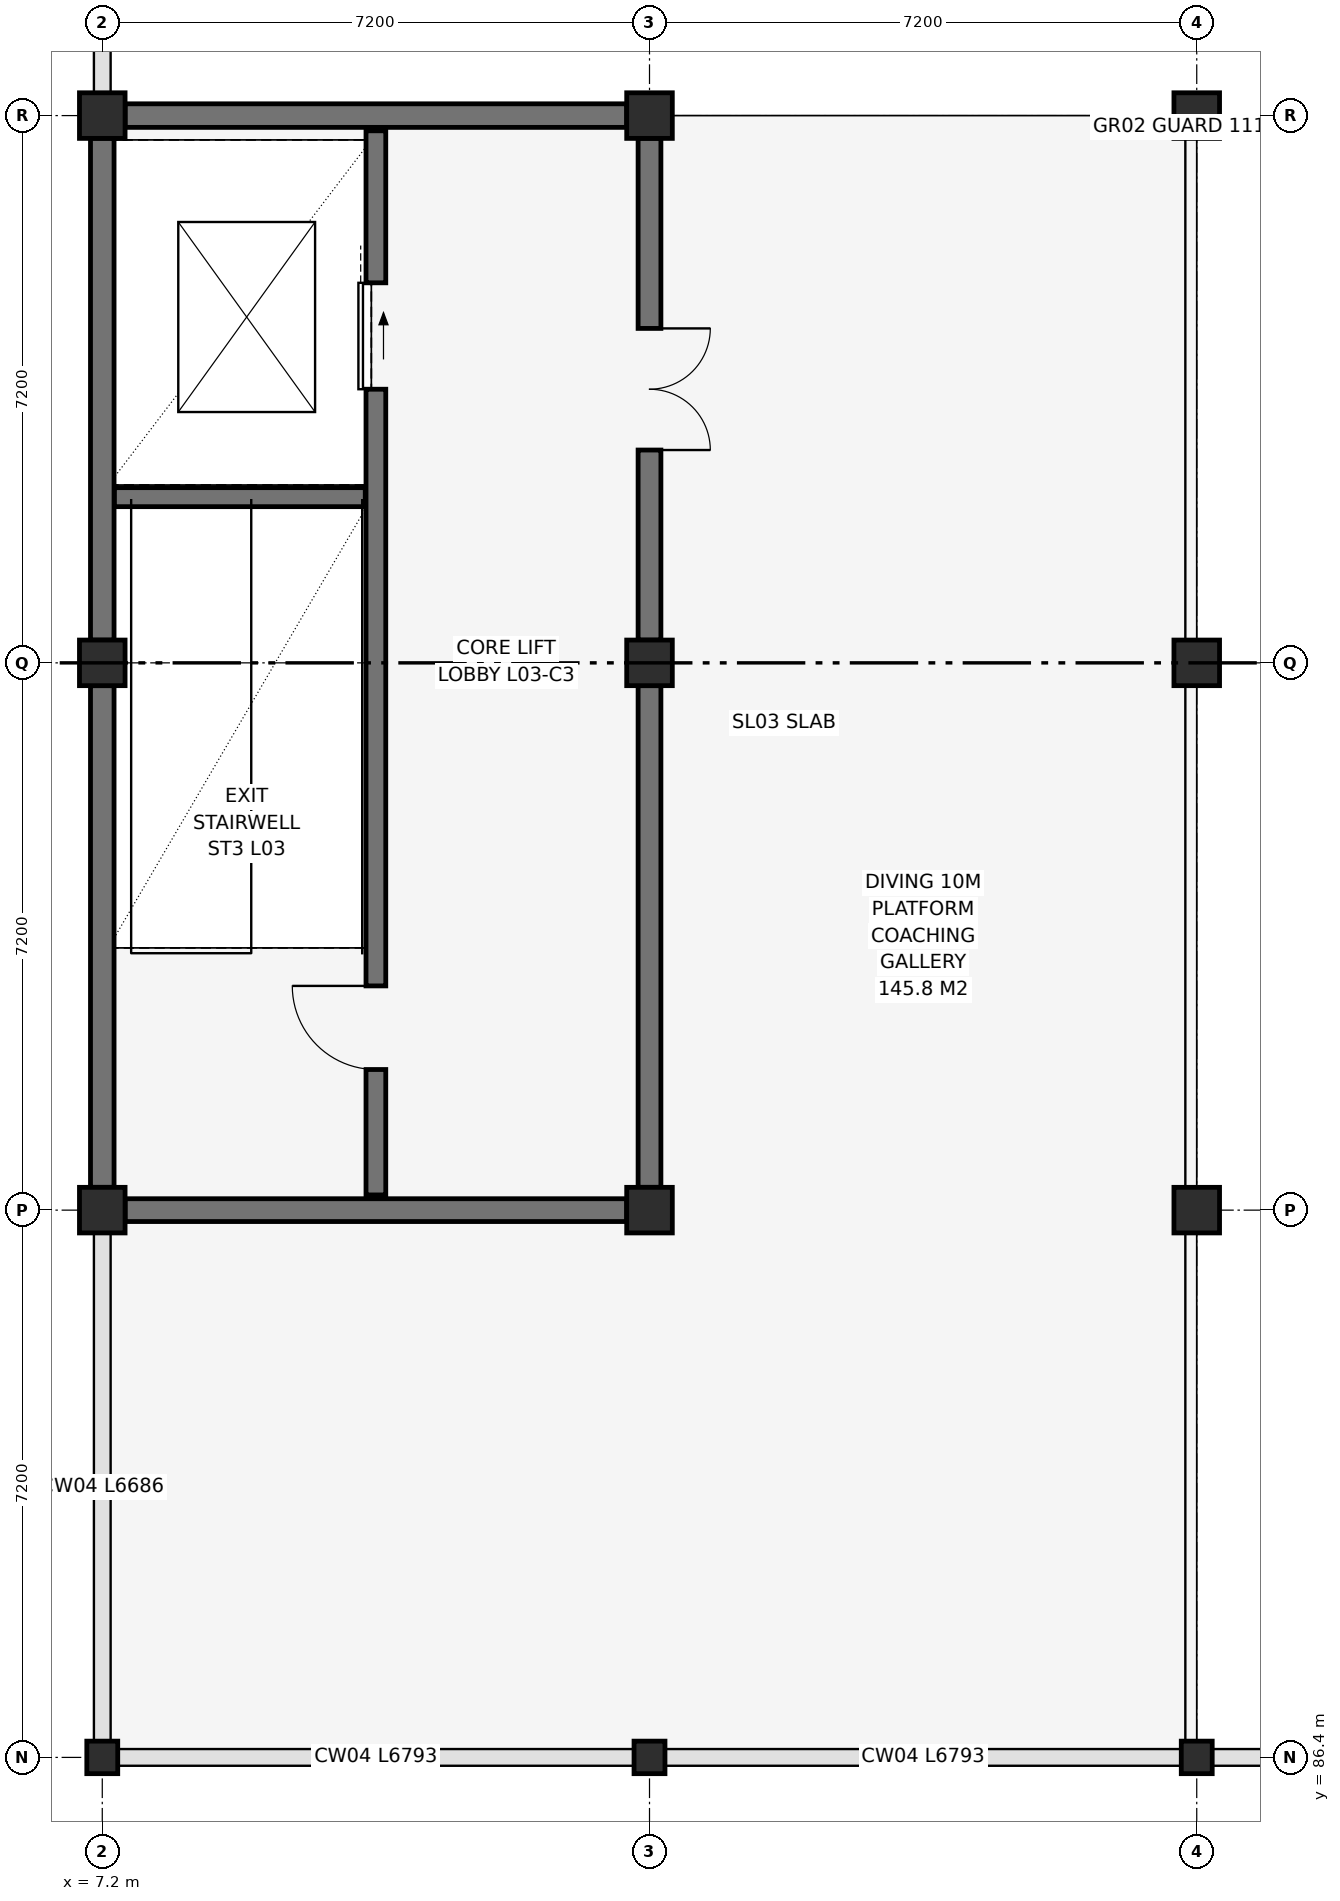
"""IFC4 building model, lengths in metres.
Left out: names, types, materials, properties, quantities, classifications, styles, units other than length and angle.
Written with IfcOpenShell. Run it as: python <this file> out.ifc"""

import sys

from ifc_helpers import new_model, si_unit, direction, frame, frame_2d, origin, origin_2d, place, context, subcontext, project, spatial, rectangle, i_section, extrude, element, fill, save


model = new_model("IFC4")
c1 = context("Model", 3, precision=1e-05, world=origin(), true_north=direction((0.0, 1.0)))
c2 = subcontext(c1, "Body", "Model", "MODEL_VIEW")
j1 = project(units=[si_unit("LENGTHUNIT", "METRE"), si_unit("PLANEANGLEUNIT", "RADIAN")], contexts=[c1])
p1 = place(None, origin())
s1 = spatial("IfcSite", under=j1, at=p1, CompositionType="ELEMENT")
p2 = place(p1, origin())
s2 = spatial("IfcBuilding", under=s1, at=p2, CompositionType="ELEMENT")
p3 = place(p2, frame((0.0, 0.0, 15.0)))
s3 = spatial("IfcBuildingStorey", under=s2, at=p3, CompositionType="ELEMENT", Elevation=15.0)
p4 = place(p3, frame((7.2, 86.4, 0.0), z_axis=(0.0, 0.0, 1.0), x_axis=(1.0, 0.0, 0.0)))
e1 = element("IfcColumn", 1, at=p4, inside=s3, PredefinedType="COLUMN", context=c2, shape_type="SweptSolid", body=[
    extrude(i_section(OverallWidth=0.407, OverallDepth=0.428, WebThickness=0.02, FlangeThickness=0.035, FilletRadius=0.022, at=origin_2d()), origin(), (0.0, 0.0, 1.0), 6.425),
])
for number, where, z_axis, x_axis in (
    (2, (7.2, 93.6, 0.0), (0.0, 0.0, 1.0), (1.0, 0.0, 0.0)),
    (3, (7.2, 100.8, 0.0), (0.0, 0.0, 1.0), (1.0, 0.0, 0.0)),
    (4, (7.2, 108.0, 0.0), (0.0, 0.0, 1.0), (1.0, 0.0, 0.0)),
):
    element("IfcColumn", number, at=place(p3, frame(where, z_axis=z_axis, x_axis=x_axis)), inside=s3, PredefinedType="COLUMN", context=c2, shape_type="SweptSolid", body=[
        extrude(rectangle(XDim=0.6, YDim=0.6, at=origin_2d()), origin(), (0.0, 0.0, 1.0), 4.04),
    ])
p5 = place(p3, frame((14.4, 86.4, 0.0), z_axis=(0.0, 0.0, 1.0), x_axis=(1.0, 0.0, 0.0)))
e5 = element("IfcColumn", 5, at=p5, inside=s3, PredefinedType="COLUMN", context=c2, shape_type="SweptSolid", body=[
    extrude(i_section(OverallWidth=0.407, OverallDepth=0.428, WebThickness=0.02, FlangeThickness=0.035, FilletRadius=0.022, at=origin_2d()), origin(), (0.0, 0.0, 1.0), 8.825),
])
for number, where, z_axis, x_axis in (
    (6, (14.4, 93.6, 0.0), (0.0, 0.0, 1.0), (1.0, 0.0, 0.0)),
    (7, (14.4, 100.8, 0.0), (0.0, 0.0, 1.0), (1.0, 0.0, 0.0)),
    (8, (14.4, 108.0, 0.0), (0.0, 0.0, 1.0), (1.0, 0.0, 0.0)),
):
    element("IfcColumn", number, at=place(p3, frame(where, z_axis=z_axis, x_axis=x_axis)), inside=s3, PredefinedType="COLUMN", context=c2, shape_type="SweptSolid", body=[
        extrude(rectangle(XDim=0.6, YDim=0.6, at=origin_2d()), origin(), (0.0, 0.0, 1.0), 4.04),
    ])
p6 = place(p3, frame((21.6, 86.4, 0.0), z_axis=(0.0, 0.0, 1.0), x_axis=(1.0, 0.0, 0.0)))
e9 = element("IfcColumn", 9, at=p6, inside=s3, PredefinedType="COLUMN", context=c2, shape_type="SweptSolid", body=[
    extrude(i_section(OverallWidth=0.407, OverallDepth=0.428, WebThickness=0.02, FlangeThickness=0.035, FilletRadius=0.022, at=origin_2d()), origin(), (0.0, 0.0, 1.0), 6.425),
])
for number, where, z_axis, x_axis in (
    (10, (21.6, 93.6, 0.0), (0.0, 0.0, 1.0), (1.0, 0.0, 0.0)),
    (11, (21.6, 100.8, 0.0), (0.0, 0.0, 1.0), (1.0, 0.0, 0.0)),
    (12, (21.6, 108.0, 0.0), (0.0, 0.0, 1.0), (1.0, 0.0, 0.0)),
):
    element("IfcColumn", number, at=place(p3, frame(where, z_axis=z_axis, x_axis=x_axis)), inside=s3, PredefinedType="COLUMN", context=c2, shape_type="SweptSolid", body=[
        extrude(rectangle(XDim=0.6, YDim=0.6, at=origin_2d()), origin(), (0.0, 0.0, 1.0), 4.04),
    ])
p7 = place(p3, frame((7.5, 93.6, 0.0), z_axis=(0.0, 0.0, 1.0), x_axis=(1.0, 0.0, 0.0)))
e13 = element("IfcWall", 13, at=p7, inside=s3, PredefinedType="SHEAR", context=c2, shape_type="SweptSolid", body=[
    extrude(rectangle(XDim=6.6, YDim=0.3, at=frame_2d((3.3, 0.0))), origin(), (0.0, 0.0, 1.0), 3.96),
])
for number, where, z_axis, x_axis in (
    (14, (7.5, 108.0, 0.0), (0.0, 0.0, 1.0), (1.0, 0.0, 0.0)),
    (15, (7.2, 93.9, 0.0), (0.0, 0.0, 1.0), (0.0, 1.0, 0.0)),
):
    element("IfcWall", number, at=place(p3, frame(where, z_axis=z_axis, x_axis=x_axis)), inside=s3, PredefinedType="SHEAR", context=c2, shape_type="SweptSolid", body=[
        extrude(rectangle(XDim=6.6, YDim=0.31, at=frame_2d((3.3, 0.0))), origin(), (0.0, 0.0, 1.0), 3.96),
    ])
p8 = place(p3, frame((7.2, 101.1, 0.0), z_axis=(0.0, 0.0, 1.0), x_axis=(0.0, 1.0, 0.0)))
e16 = element("IfcWall", 16, at=p8, inside=s3, PredefinedType="SHEAR", context=c2, shape_type="SweptSolid", body=[
    extrude(rectangle(XDim=6.6, YDim=0.31, at=frame_2d((3.3, 0.0))), origin(), (0.0, 0.0, 1.0), 3.96),
])
p9 = place(p3, frame((14.4, 93.9, 0.0), z_axis=(0.0, 0.0, 1.0), x_axis=(0.0, 1.0, 0.0)))
e17 = element("IfcWall", 17, at=p9, inside=s3, PredefinedType="SHEAR", context=c2, shape_type="SweptSolid", body=[
    extrude(rectangle(XDim=6.6, YDim=0.3, at=frame_2d((3.3, 0.0))), origin(), (0.0, 0.0, 1.0), 3.96),
])
p10 = place(p3, frame((14.4, 101.1, 0.0), z_axis=(0.0, 0.0, 1.0), x_axis=(0.0, 1.0, 0.0)))
e18 = element("IfcWall", 18, at=p10, inside=s3, PredefinedType="SHEAR", context=c2, shape_type="SweptSolid", body=[
    extrude(rectangle(XDim=6.6, YDim=0.3, at=frame_2d((3.3, 0.0))), origin(), (0.0, 0.0, 1.0), 3.96),
])
p11 = place(p10, frame((2.5, 0.0, 0.0)))
e19 = element("IfcOpeningElement", 19, at=p11, cuts=e18, PredefinedType="OPENING", context=c2, shape_type="SweptSolid", body=[
    extrude(rectangle(XDim=1.6, YDim=2.2, at=frame_2d((0.8, 1.1))), frame((0.0, 0.165, 0.0), z_axis=(0.0, -1.0, 0.0), x_axis=(1.0, 0.0, 0.0)), (0.0, 0.0, 1.0), 0.33),
])
p12 = place(p3, frame((10.8, 93.8, 0.0), z_axis=(0.0, 0.0, 1.0), x_axis=(0.0, 1.0, 0.0)))
e20 = element("IfcWall", 20, at=p12, inside=s3, PredefinedType="SHEAR", context=c2, shape_type="SweptSolid", body=[
    extrude(rectangle(XDim=14.0, YDim=0.26, at=frame_2d((7.0, 0.0))), origin(), (0.0, 0.0, 1.0), 3.96),
])
p13 = place(p12, frame((1.65, 0.0, 0.0)))
e21 = element("IfcOpeningElement", 21, at=p13, cuts=e20, PredefinedType="OPENING", context=c2, shape_type="SweptSolid", body=[
    extrude(rectangle(XDim=1.1, YDim=2.15, at=frame_2d((0.55, 1.075))), frame((0.0, 0.145, 0.0), z_axis=(0.0, -1.0, 0.0), x_axis=(1.0, 0.0, 0.0)), (0.0, 0.0, 1.0), 0.29),
])
p14 = place(p12, frame((10.6, 0.0, 0.0)))
e22 = element("IfcOpeningElement", 22, at=p14, cuts=e20, PredefinedType="OPENING", context=c2, shape_type="SweptSolid", body=[
    extrude(rectangle(XDim=1.4, YDim=2.3, at=frame_2d((0.7, 1.15))), frame((0.0, 0.145, 0.0), z_axis=(0.0, -1.0, 0.0), x_axis=(1.0, 0.0, 0.0)), (0.0, 0.0, 1.0), 0.29),
])
p15 = place(p3, frame((7.36, 102.98, 0.0), z_axis=(0.0, 0.0, 1.0), x_axis=(1.0, 0.0, 0.0)))
e23 = element("IfcWall", 23, at=p15, inside=s3, PredefinedType="SHEAR", context=c2, shape_type="SweptSolid", body=[
    extrude(rectangle(XDim=3.3, YDim=0.25, at=frame_2d((1.65, 0.0))), origin(), (0.0, 0.0, 1.0), 3.96),
])
p16 = place(p13, origin())
e24 = element("IfcDoor", 24, at=p16, inside=s3, OperationType="SINGLE_SWING_RIGHT", PredefinedType="DOOR", context=c2, shape_type="SweptSolid", body=[
    extrude(rectangle(XDim=1.1, YDim=2.15, at=frame_2d((0.55, 1.075))), frame((0.0, 0.025, 0.0), z_axis=(0.0, -1.0, 0.0), x_axis=(1.0, 0.0, 0.0)), (0.0, 0.0, 1.0), 0.05),
])
fill(e21, e24)
p17 = place(p14, frame((1.4, 0.0, 0.0), z_axis=(0.0, 0.0, 1.0), x_axis=(-1.0, 0.0, 0.0)))
e25 = element("IfcDoor", 25, at=p17, inside=s3, OperationType="SLIDING_TO_RIGHT", PredefinedType="DOOR", context=c2, shape_type="SweptSolid", body=[
    extrude(rectangle(XDim=1.4, YDim=2.3, at=frame_2d((0.7, 1.15))), frame((0.0, 0.025, 0.0), z_axis=(0.0, -1.0, 0.0), x_axis=(1.0, 0.0, 0.0)), (0.0, 0.0, 1.0), 0.05),
])
fill(e22, e25)
p18 = place(p11, frame((1.6, 0.0, 0.0), z_axis=(0.0, 0.0, 1.0), x_axis=(-1.0, 0.0, 0.0)))
e26 = element("IfcDoor", 26, at=p18, inside=s3, OperationType="DOUBLE_SWING_LEFT", PredefinedType="DOOR", context=c2, shape_type="SweptSolid", body=[
    extrude(rectangle(XDim=1.6, YDim=2.2, at=frame_2d((0.8, 1.1))), frame((0.0, 0.025, 0.0), z_axis=(0.0, -1.0, 0.0), x_axis=(1.0, 0.0, 0.0)), (0.0, 0.0, 1.0), 0.05),
])
fill(e19, e26)
save(model, sys.argv[1])
